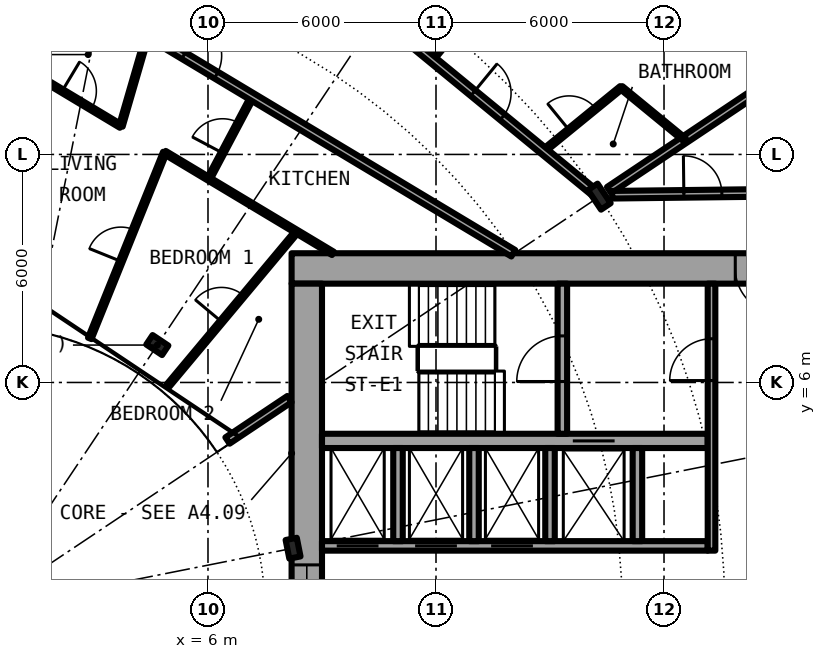
"""IFC4 building model, lengths in metres.
Left out: names, types, materials, properties, quantities, classifications, styles, units other than length and angle.
Written with IfcOpenShell. Run it as: python <this file> out.ifc"""

import sys

from ifc_helpers import new_model, si_unit, direction, frame, frame_2d, origin, origin_2d, place, context, subcontext, project, spatial, rectangle, i_section, extrude, element, fill, save


model = new_model("IFC4")
c1 = context("Model", 3, precision=1e-05, world=origin(), true_north=direction((0.0, 1.0)))
c2 = subcontext(c1, "Body", "Model", "MODEL_VIEW")
j1 = project(units=[si_unit("LENGTHUNIT", "METRE"), si_unit("PLANEANGLEUNIT", "RADIAN")], contexts=[c1])
p1 = place(None, origin())
s1 = spatial("IfcSite", under=j1, at=p1, CompositionType="ELEMENT")
p2 = place(p1, origin())
s2 = spatial("IfcBuilding", under=s1, at=p2, CompositionType="ELEMENT")
p3 = place(p2, frame((0.0, 0.0, 47.2)))
s3 = spatial("IfcBuildingStorey", under=s2, at=p3, CompositionType="ELEMENT", Elevation=47.2)
p4 = place(p3, frame((16.297, 10.889, 0.0), z_axis=(0.0, 0.0, 1.0), x_axis=(0.831469612303, 0.55557023302, 0.0)))
e1 = element("IfcColumn", 1, at=p4, inside=s3, PredefinedType="COLUMN", context=c2, shape_type="SweptSolid", body=[
    extrude(i_section(OverallWidth=0.305, OverallDepth=0.62, WebThickness=0.021, FlangeThickness=0.04, FilletRadius=0.027, at=origin_2d()), origin(), (0.0, 0.0, 1.0), 3.05),
])
for number, where, z_axis, x_axis in (
    (2, (8.239, 1.639, 0.0), (0.0, 0.0, 1.0), (0.981, 0.195, 0.0)),
    (3, (4.667, 6.984, 0.0), (0.0, 0.0, 1.0), (0.556, 0.831, 0.0)),
):
    element("IfcColumn", number, at=place(p3, frame(where, z_axis=z_axis, x_axis=x_axis)), inside=s3, PredefinedType="COLUMN", context=c2, shape_type="SweptSolid", body=[
        extrude(i_section(OverallWidth=0.3, OverallDepth=0.5, WebThickness=0.014, FlangeThickness=0.028, FilletRadius=0.027, at=origin_2d()), origin(), (0.0, 0.0, 1.0), 3.05),
    ])
p5 = place(p3, frame((22.4, 9.0, 0.0), z_axis=(0.0, 0.0, 1.0), x_axis=(-1.0, 0.0, 0.0)))
e4 = element("IfcWall", 4, at=p5, inside=s3, PredefinedType="SHEAR", context=c2, shape_type="SweptSolid", body=[
    extrude(rectangle(XDim=14.2, YDim=0.8, at=frame_2d((7.1, 0.0))), origin(), (0.0, 0.0, 1.0), 3.05),
])
p6 = place(p5, frame((1.325, 0.0, 0.0)))
e5 = element("IfcOpeningElement", 5, at=p6, cuts=e4, PredefinedType="OPENING", context=c2, shape_type="SweptSolid", body=[
    extrude(rectangle(XDim=1.2, YDim=2.3, at=frame_2d((0.6, 1.15))), frame((0.0, 0.41, 0.0), z_axis=(0.0, -1.0, 0.0), x_axis=(1.0, 0.0, 0.0)), (0.0, 0.0, 1.0), 0.82),
])
p7 = place(p3, frame((8.6, -8.6, 0.0), z_axis=(0.0, 0.0, 1.0), x_axis=(0.0, 1.0, 0.0)))
e6 = element("IfcWall", 6, at=p7, inside=s3, PredefinedType="SHEAR", context=c2, shape_type="SweptSolid", body=[
    extrude(rectangle(XDim=17.2, YDim=0.8, at=frame_2d((8.6, 0.0))), origin(), (0.0, 0.0, 1.0), 3.05),
])
p8 = place(p7, frame((7.4, 0.0, 0.1)))
e7 = element("IfcOpeningElement", 7, at=p8, cuts=e6, PredefinedType="OPENING", context=c2, shape_type="SweptSolid", body=[
    extrude(rectangle(XDim=2.4, YDim=2.2, at=frame_2d((1.2, 1.1))), frame((0.0, 0.41, 0.0), z_axis=(0.0, -1.0, 0.0), x_axis=(1.0, 0.0, 0.0)), (0.0, 0.0, 1.0), 0.82),
])
p9 = place(p3, frame((9.0, 1.7, 0.0), z_axis=(0.0, 0.0, 1.0), x_axis=(1.0, 0.0, 0.0)))
e8 = element("IfcWall", 8, at=p9, inside=s3, PredefinedType="SHEAR", context=c2, shape_type="SweptSolid", body=[
    extrude(rectangle(XDim=10.15, YDim=0.25, at=frame_2d((5.075, 0.0))), origin(), (0.0, 0.0, 1.0), 3.05),
])
p10 = place(p9, frame((0.387, 0.0, 0.0)))
e9 = element("IfcOpeningElement", 9, at=p10, cuts=e8, PredefinedType="OPENING", context=c2, shape_type="SweptSolid", body=[
    extrude(rectangle(XDim=1.1, YDim=2.3, at=frame_2d((0.55, 1.15))), frame((0.0, 0.135, 0.0), z_axis=(0.0, -1.0, 0.0), x_axis=(1.0, 0.0, 0.0)), (0.0, 0.0, 1.0), 0.27),
])
p11 = place(p9, frame((2.45, 0.0, 0.0)))
e10 = element("IfcOpeningElement", 10, at=p11, cuts=e8, PredefinedType="OPENING", context=c2, shape_type="SweptSolid", body=[
    extrude(rectangle(XDim=1.1, YDim=2.3, at=frame_2d((0.55, 1.15))), frame((0.0, 0.135, 0.0), z_axis=(0.0, -1.0, 0.0), x_axis=(1.0, 0.0, 0.0)), (0.0, 0.0, 1.0), 0.27),
])
p12 = place(p9, frame((4.45, 0.0, 0.0)))
e11 = element("IfcOpeningElement", 11, at=p12, cuts=e8, PredefinedType="OPENING", context=c2, shape_type="SweptSolid", body=[
    extrude(rectangle(XDim=1.1, YDim=2.3, at=frame_2d((0.55, 1.15))), frame((0.0, 0.135, 0.0), z_axis=(0.0, -1.0, 0.0), x_axis=(1.0, 0.0, 0.0)), (0.0, 0.0, 1.0), 0.27),
])
p13 = place(p3, frame((9.0, 4.462, 0.0), z_axis=(0.0, 0.0, 1.0), x_axis=(1.0, 0.0, 0.0)))
e12 = element("IfcWall", 12, at=p13, inside=s3, PredefinedType="SHEAR", context=c2, shape_type="SweptSolid", body=[
    extrude(rectangle(XDim=10.15, YDim=0.375, at=frame_2d((5.075, 0.0))), origin(), (0.0, 0.0, 1.0), 3.05),
])
p14 = place(p13, frame((6.6, 0.0, 0.0)))
e13 = element("IfcOpeningElement", 13, at=p14, cuts=e12, PredefinedType="OPENING", context=c2, shape_type="SweptSolid", body=[
    extrude(rectangle(XDim=1.1, YDim=2.3, at=frame_2d((0.55, 1.15))), frame((0.0, 0.198, 0.0), z_axis=(0.0, -1.0, 0.0), x_axis=(1.0, 0.0, 0.0)), (0.0, 0.0, 1.0), 0.395),
])
p15 = place(p3, frame((15.325, 4.65, 0.0), z_axis=(0.0, 0.0, 1.0), x_axis=(0.0, 1.0, 0.0)))
e14 = element("IfcWall", 14, at=p15, inside=s3, PredefinedType="SHEAR", context=c2, shape_type="SweptSolid", body=[
    extrude(rectangle(XDim=3.95, YDim=0.25, at=frame_2d((1.975, 0.0))), origin(), (0.0, 0.0, 1.0), 3.05),
])
p16 = place(p15, frame((1.375, 0.0, 0.0)))
e15 = element("IfcOpeningElement", 15, at=p16, cuts=e14, PredefinedType="OPENING", context=c2, shape_type="SweptSolid", body=[
    extrude(rectangle(XDim=1.2, YDim=2.3, at=frame_2d((0.6, 1.15))), frame((0.0, 0.135, 0.0), z_axis=(0.0, -1.0, 0.0), x_axis=(1.0, 0.0, 0.0)), (0.0, 0.0, 1.0), 0.27),
])
for number, where, z_axis, x_axis in (
    (16, (15.0, 1.825, 0.0), (0.0, 0.0, 1.0), (0.0, 1.0, 0.0)),
    (17, (17.3, 1.825, 0.0), (0.0, 0.0, 1.0), (0.0, 1.0, 0.0)),
):
    element("IfcWall", number, at=place(p3, frame(where, z_axis=z_axis, x_axis=x_axis)), inside=s3, PredefinedType="SOLIDWALL", context=c2, shape_type="SweptSolid", body=[
        extrude(rectangle(XDim=2.45, YDim=0.25, at=frame_2d((1.225, 0.0))), origin(), (0.0, 0.0, 1.0), 2.7),
    ])
p17 = place(p3, frame((19.25, 1.575, 0.0), z_axis=(0.0, 0.0, 1.0), x_axis=(0.0, 1.0, 0.0)))
e18 = element("IfcWall", 18, at=p17, inside=s3, PredefinedType="SOLIDWALL", context=c2, shape_type="SweptSolid", body=[
    extrude(rectangle(XDim=7.025, YDim=0.2, at=frame_2d((3.513, 0.0))), origin(), (0.0, 0.0, 1.0), 2.7),
])
p18 = place(p17, frame((4.475, 0.0, 0.0)))
e19 = element("IfcOpeningElement", 19, at=p18, cuts=e18, PredefinedType="OPENING", context=c2, shape_type="SweptSolid", body=[
    extrude(rectangle(XDim=1.1, YDim=2.3, at=frame_2d((0.55, 1.15))), frame((0.0, 0.11, 0.0), z_axis=(0.0, -1.0, 0.0), x_axis=(1.0, 0.0, 0.0)), (0.0, 0.0, 1.0), 0.22),
])
for number, where, z_axis, x_axis in (
    (20, (11.0, 1.825, 0.0), (0.0, 0.0, 1.0), (0.0, 1.0, 0.0)),
    (21, (13.0, 1.825, 0.0), (0.0, 0.0, 1.0), (0.0, 1.0, 0.0)),
):
    element("IfcWall", number, at=place(p3, frame(where, z_axis=z_axis, x_axis=x_axis)), inside=s3, PredefinedType="SOLIDWALL", context=c2, shape_type="SweptSolid", body=[
        extrude(rectangle(XDim=2.45, YDim=0.25, at=frame_2d((1.225, 0.0))), origin(), (0.0, 0.0, 1.0), 2.7),
    ])
p19 = place(p3, frame((2.889, 7.159, 0.0), z_axis=(0.0, 0.0, 1.0), x_axis=(0.374372761824, 0.927278294367, 0.0)))
e22 = element("IfcWall", 22, at=p19, inside=s3, PredefinedType="PARTITIONING", context=c2, shape_type="SweptSolid", body=[
    extrude(rectangle(XDim=5.276, YDim=0.1, at=frame_2d((2.638, 0.0))), origin(), (0.0, 0.0, 1.0), 2.7),
])
p20 = place(p19, frame((2.188, 0.0, 0.0)))
e23 = element("IfcOpeningElement", 23, at=p20, cuts=e22, PredefinedType="OPENING", context=c2, shape_type="SweptSolid", body=[
    extrude(rectangle(XDim=0.9, YDim=2.3, at=frame_2d((0.45, 1.15))), frame((0.0, 0.06, 0.0), z_axis=(0.0, -1.0, 0.0), x_axis=(1.0, 0.0, 0.0)), (0.0, 0.0, 1.0), 0.12),
])
p21 = place(p3, frame((3.706, 12.744, 0.0), z_axis=(0.0, 0.0, 1.0), x_axis=(0.279201466266, 0.960232545395, 0.0)))
e24 = element("IfcWall", 24, at=p21, inside=s3, PredefinedType="PARTITIONING", context=c2, shape_type="SweptSolid", body=[
    extrude(rectangle(XDim=2.524, YDim=0.1, at=frame_2d((1.262, 0.0))), origin(), (0.0, 0.0, 1.0), 2.7),
])
p22 = place(p3, frame((4.952, 5.923, 0.0), z_axis=(0.0, 0.0, 1.0), x_axis=(0.641376424834, 0.767226356213, 0.0)))
e25 = element("IfcWall", 25, at=p22, inside=s3, PredefinedType="PARTITIONING", context=c2, shape_type="SweptSolid", body=[
    extrude(rectangle(XDim=5.275, YDim=0.1, at=frame_2d((2.637, 0.0))), origin(), (0.0, 0.0, 1.0), 2.7),
])
p23 = place(p22, frame((2.187, 0.0, 0.0)))
e26 = element("IfcOpeningElement", 26, at=p23, cuts=e25, PredefinedType="OPENING", context=c2, shape_type="SweptSolid", body=[
    extrude(rectangle(XDim=0.9, YDim=2.3, at=frame_2d((0.45, 1.15))), frame((0.0, 0.06, 0.0), z_axis=(0.0, -1.0, 0.0), x_axis=(1.0, 0.0, 0.0)), (0.0, 0.0, 1.0), 0.12),
])
p24 = place(p3, frame((6.021, 11.357, 0.0), z_axis=(0.0, 0.0, 1.0), x_axis=(0.468337293896, 0.883549760425, 0.0)))
e27 = element("IfcWall", 27, at=p24, inside=s3, PredefinedType="PARTITIONING", context=c2, shape_type="SweptSolid", body=[
    extrude(rectangle(XDim=2.445, YDim=0.1, at=frame_2d((1.222, 0.0))), origin(), (0.0, 0.0, 1.0), 2.7),
])
p25 = place(p24, frame((0.772, 0.0, 0.0)))
e28 = element("IfcOpeningElement", 28, at=p25, cuts=e27, PredefinedType="OPENING", context=c2, shape_type="SweptSolid", body=[
    extrude(rectangle(XDim=0.9, YDim=2.3, at=frame_2d((0.45, 1.15))), frame((0.0, 0.06, 0.0), z_axis=(0.0, -1.0, 0.0), x_axis=(1.0, 0.0, 0.0)), (0.0, 0.0, 1.0), 0.12),
])
p26 = place(p3, frame((11.899, 14.499, 0.0), z_axis=(0.0, 0.0, 1.0), x_axis=(0.634396151441, 0.77300810024, 0.0)))
e29 = element("IfcWall", 29, at=p26, inside=s3, PredefinedType="PARTITIONING", context=c2, shape_type="SweptSolid", body=[
    extrude(rectangle(XDim=8.419, YDim=0.1, at=frame_2d((4.209, 0.0))), origin(), (0.0, 0.0, 1.0), 2.7),
])
p27 = place(p26, frame((0.84, 0.0, 0.0)))
e30 = element("IfcOpeningElement", 30, at=p27, cuts=e29, PredefinedType="OPENING", context=c2, shape_type="SweptSolid", body=[
    extrude(rectangle(XDim=0.9, YDim=2.3, at=frame_2d((0.45, 1.15))), frame((0.0, 0.06, 0.0), z_axis=(0.0, -1.0, 0.0), x_axis=(1.0, 0.0, 0.0)), (0.0, 0.0, 1.0), 0.12),
])
p28 = place(p26, frame((5.051, 0.0, 0.0)))
e31 = element("IfcOpeningElement", 31, at=p28, cuts=e29, PredefinedType="OPENING", context=c2, shape_type="SweptSolid", body=[
    extrude(rectangle(XDim=0.9, YDim=2.3, at=frame_2d((0.45, 1.15))), frame((0.0, 0.06, 0.0), z_axis=(0.0, -1.0, 0.0), x_axis=(1.0, 0.0, 0.0)), (0.0, 0.0, 1.0), 0.12),
])
p29 = place(p3, frame((14.831, 12.092, 0.0), z_axis=(0.0, 0.0, 1.0), x_axis=(0.774979608522, 0.631986239072, 0.0)))
e32 = element("IfcWall", 32, at=p29, inside=s3, PredefinedType="PARTITIONING", context=c2, shape_type="SweptSolid", body=[
    extrude(rectangle(XDim=2.636, YDim=0.1, at=frame_2d((1.318, 0.0))), origin(), (0.0, 0.0, 1.0), 2.7),
])
p30 = place(p29, frame((0.868, 0.0, 0.0)))
e33 = element("IfcOpeningElement", 33, at=p30, cuts=e32, PredefinedType="OPENING", context=c2, shape_type="SweptSolid", body=[
    extrude(rectangle(XDim=0.9, YDim=2.3, at=frame_2d((0.45, 1.15))), frame((0.0, 0.06, 0.0), z_axis=(0.0, -1.0, 0.0), x_axis=(1.0, 0.0, 0.0)), (0.0, 0.0, 1.0), 0.12),
])
p31 = place(p3, frame((16.555, 11.061, 0.0), z_axis=(0.0, 0.0, 1.0), x_axis=(0.831403467378, 0.55566921314, 0.0)))
e34 = element("IfcWall", 34, at=p31, inside=s3, PredefinedType="PARTITIONING", context=c2, shape_type="SweptSolid", body=[
    extrude(rectangle(XDim=7.265, YDim=0.2, at=frame_2d((3.632, 0.0))), origin(), (0.0, 0.0, 1.0), 2.7),
])
p32 = place(p3, frame((6.513, 4.472, 0.0), z_axis=(0.0, 0.0, 1.0), x_axis=(0.831417956244, 0.555647533996, 0.0)))
e35 = element("IfcWall", 35, at=p32, inside=s3, PredefinedType="PARTITIONING", context=c2, shape_type="SweptSolid", body=[
    extrude(rectangle(XDim=1.962, YDim=0.2, at=frame_2d((0.981, 0.0))), origin(), (0.0, 0.0, 1.0), 2.7),
])
p33 = place(p3, frame((16.636, 10.94, 0.0), z_axis=(0.0, 0.0, 1.0), x_axis=(0.999928980998, 0.011917758204, 0.0)))
e36 = element("IfcWall", 36, at=p33, inside=s3, PredefinedType="PARTITIONING", context=c2, shape_type="SweptSolid", body=[
    extrude(rectangle(XDim=5.039, YDim=0.2, at=frame_2d((2.52, 0.0))), origin(), (0.0, 0.0, 1.0), 2.7),
])
p34 = place(p33, frame((1.886, 0.0, 0.0)))
e37 = element("IfcOpeningElement", 37, at=p34, cuts=e36, PredefinedType="OPENING", context=c2, shape_type="SweptSolid", body=[
    extrude(rectangle(XDim=1.0, YDim=2.3, at=frame_2d((0.5, 1.15))), frame((0.0, 0.11, 0.0), z_axis=(0.0, -1.0, 0.0), x_axis=(1.0, 0.0, 0.0)), (0.0, 0.0, 1.0), 0.22),
])
p35 = place(p3, frame((1.392, 14.132, 0.0), z_axis=(0.0, 0.0, 1.0), x_axis=(0.857524856518, -0.514442533674, 0.0)))
e38 = element("IfcWall", 38, at=p35, inside=s3, PredefinedType="PARTITIONING", context=c2, shape_type="SweptSolid", body=[
    extrude(rectangle(XDim=2.698, YDim=0.1, at=frame_2d((1.349, 0.0))), origin(), (0.0, 0.0, 1.0), 2.7),
])
p36 = place(p35, frame((0.899, 0.0, 0.0)))
e39 = element("IfcOpeningElement", 39, at=p36, cuts=e38, PredefinedType="OPENING", context=c2, shape_type="SweptSolid", body=[
    extrude(rectangle(XDim=0.9, YDim=2.3, at=frame_2d((0.45, 1.15))), frame((0.0, 0.06, 0.0), z_axis=(0.0, -1.0, 0.0), x_axis=(1.0, 0.0, 0.0)), (0.0, 0.0, 1.0), 0.12),
])
p37 = place(p3, frame((4.863, 12.05, 0.0), z_axis=(0.0, 0.0, 1.0), x_axis=(0.857576410704, -0.51435658818, 0.0)))
e40 = element("IfcWall", 40, at=p37, inside=s3, PredefinedType="PARTITIONING", context=c2, shape_type="SweptSolid", body=[
    extrude(rectangle(XDim=5.16, YDim=0.1, at=frame_2d((2.58, 0.0))), origin(), (0.0, 0.0, 1.0), 2.7),
])
p38 = place(p3, frame((1.658, 16.819, 0.0), z_axis=(0.0, 0.0, 1.0), x_axis=(0.857688434449, -0.514169767113, 0.0)))
e41 = element("IfcWall", 41, at=p38, inside=s3, PredefinedType="PARTITIONING", context=c2, shape_type="SweptSolid", body=[
    extrude(rectangle(XDim=14.429, YDim=0.2, at=frame_2d((7.215, 0.0))), origin(), (0.0, 0.0, 1.0), 2.7),
])
p39 = place(p38, frame((4.316, 0.0, 0.0)))
e42 = element("IfcOpeningElement", 42, at=p39, cuts=e41, PredefinedType="OPENING", context=c2, shape_type="SweptSolid", body=[
    extrude(rectangle(XDim=1.0, YDim=2.3, at=frame_2d((0.5, 1.15))), frame((0.0, 0.11, 0.0), z_axis=(0.0, -1.0, 0.0), x_axis=(1.0, 0.0, 0.0)), (0.0, 0.0, 1.0), 0.22),
])
p40 = place(p3, frame((7.5, 18.108, 0.0), z_axis=(0.0, 0.0, 1.0), x_axis=(0.773041360816, -0.634355621452, 0.0)))
e43 = element("IfcWall", 43, at=p40, inside=s3, PredefinedType="PARTITIONING", context=c2, shape_type="SweptSolid", body=[
    extrude(rectangle(XDim=11.221, YDim=0.2, at=frame_2d((5.61, 0.0))), origin(), (0.0, 0.0, 1.0), 2.38),
])
p41 = place(p40, frame((7.083, 0.0, 0.0)))
e44 = element("IfcOpeningElement", 44, at=p41, cuts=e43, PredefinedType="OPENING", context=c2, shape_type="SweptSolid", body=[
    extrude(rectangle(XDim=1.0, YDim=2.3, at=frame_2d((0.5, 1.15))), frame((0.0, 0.11, 0.0), z_axis=(0.0, -1.0, 0.0), x_axis=(1.0, 0.0, 0.0)), (0.0, 0.0, 1.0), 0.22),
])
p42 = place(p3, frame((16.874, 13.758, 0.0), z_axis=(0.0, 0.0, 1.0), x_axis=(0.772948171844, -0.634469166818, 0.0)))
e45 = element("IfcWall", 45, at=p42, inside=s3, PredefinedType="PARTITIONING", context=c2, shape_type="SweptSolid", body=[
    extrude(rectangle(XDim=2.158, YDim=0.1, at=frame_2d((1.079, 0.0))), origin(), (0.0, 0.0, 1.0), 2.7),
])
p43 = place(p10, origin())
e46 = element("IfcDoor", 46, at=p43, inside=s3, OperationType="DOUBLE_DOOR_SLIDING", PredefinedType="DOOR", context=c2, shape_type="SweptSolid", body=[
    extrude(rectangle(XDim=1.1, YDim=2.3, at=frame_2d((0.55, 1.15))), frame((0.0, 0.025, 0.0), z_axis=(0.0, -1.0, 0.0), x_axis=(1.0, 0.0, 0.0)), (0.0, 0.0, 1.0), 0.05),
])
fill(e9, e46)
p44 = place(p11, origin())
e47 = element("IfcDoor", 47, at=p44, inside=s3, OperationType="DOUBLE_DOOR_SLIDING", PredefinedType="DOOR", context=c2, shape_type="SweptSolid", body=[
    extrude(rectangle(XDim=1.1, YDim=2.3, at=frame_2d((0.55, 1.15))), frame((0.0, 0.025, 0.0), z_axis=(0.0, -1.0, 0.0), x_axis=(1.0, 0.0, 0.0)), (0.0, 0.0, 1.0), 0.05),
])
fill(e10, e47)
p45 = place(p12, origin())
e48 = element("IfcDoor", 48, at=p45, inside=s3, OperationType="DOUBLE_DOOR_SLIDING", PredefinedType="DOOR", context=c2, shape_type="SweptSolid", body=[
    extrude(rectangle(XDim=1.1, YDim=2.3, at=frame_2d((0.55, 1.15))), frame((0.0, 0.025, 0.0), z_axis=(0.0, -1.0, 0.0), x_axis=(1.0, 0.0, 0.0)), (0.0, 0.0, 1.0), 0.05),
])
fill(e11, e48)
p46 = place(p14, origin())
e49 = element("IfcDoor", 49, at=p46, inside=s3, OperationType="DOUBLE_DOOR_SLIDING", PredefinedType="DOOR", context=c2, shape_type="SweptSolid", body=[
    extrude(rectangle(XDim=1.1, YDim=2.3, at=frame_2d((0.55, 1.15))), frame((0.0, 0.025, 0.0), z_axis=(0.0, -1.0, 0.0), x_axis=(1.0, 0.0, 0.0)), (0.0, 0.0, 1.0), 0.05),
])
fill(e13, e49)
p47 = place(p16, origin())
e50 = element("IfcDoor", 50, at=p47, inside=s3, OperationType="SINGLE_SWING_LEFT", PredefinedType="DOOR", context=c2, shape_type="SweptSolid", body=[
    extrude(rectangle(XDim=1.2, YDim=2.3, at=frame_2d((0.6, 1.15))), frame((0.0, 0.025, 0.0), z_axis=(0.0, -1.0, 0.0), x_axis=(1.0, 0.0, 0.0)), (0.0, 0.0, 1.0), 0.05),
])
fill(e15, e50)
p48 = place(p18, origin())
e51 = element("IfcDoor", 51, at=p48, inside=s3, OperationType="SINGLE_SWING_LEFT", PredefinedType="DOOR", context=c2, shape_type="SweptSolid", body=[
    extrude(rectangle(XDim=1.1, YDim=2.3, at=frame_2d((0.55, 1.15))), frame((0.0, 0.025, 0.0), z_axis=(0.0, -1.0, 0.0), x_axis=(1.0, 0.0, 0.0)), (0.0, 0.0, 1.0), 0.05),
])
fill(e19, e51)
p49 = place(p6, origin())
e52 = element("IfcDoor", 52, at=p49, inside=s3, OperationType="SINGLE_SWING_RIGHT", PredefinedType="DOOR", context=c2, shape_type="SweptSolid", body=[
    extrude(rectangle(XDim=1.2, YDim=2.3, at=frame_2d((0.6, 1.15))), frame((0.0, 0.025, 0.0), z_axis=(0.0, -1.0, 0.0), x_axis=(1.0, 0.0, 0.0)), (0.0, 0.0, 1.0), 0.05),
])
fill(e5, e52)
p50 = place(p8, origin())
e53 = element("IfcWindow", 53, at=p50, inside=s3, PartitioningType="SINGLE_PANEL", PredefinedType="WINDOW", context=c2, shape_type="SweptSolid", body=[
    extrude(rectangle(XDim=2.4, YDim=2.2, at=frame_2d((1.2, 1.1))), frame((0.0, 0.03, 0.0), z_axis=(0.0, -1.0, 0.0), x_axis=(1.0, 0.0, 0.0)), (0.0, 0.0, 1.0), 0.06),
])
fill(e7, e53)
p51 = place(p41, origin())
e54 = element("IfcDoor", 54, at=p51, inside=s3, OperationType="SINGLE_SWING_RIGHT", PredefinedType="DOOR", context=c2, shape_type="SweptSolid", body=[
    extrude(rectangle(XDim=1.0, YDim=2.3, at=frame_2d((0.5, 1.15))), frame((0.0, 0.025, 0.0), z_axis=(0.0, -1.0, 0.0), x_axis=(1.0, 0.0, 0.0)), (0.0, 0.0, 1.0), 0.05),
])
fill(e44, e54)
p52 = place(p30, origin())
e55 = element("IfcDoor", 55, at=p52, inside=s3, OperationType="SINGLE_SWING_RIGHT", PredefinedType="DOOR", context=c2, shape_type="SweptSolid", body=[
    extrude(rectangle(XDim=0.9, YDim=2.3, at=frame_2d((0.45, 1.15))), frame((0.0, 0.025, 0.0), z_axis=(0.0, -1.0, 0.0), x_axis=(1.0, 0.0, 0.0)), (0.0, 0.0, 1.0), 0.05),
])
fill(e33, e55)
p53 = place(p39, origin())
e56 = element("IfcDoor", 56, at=p53, inside=s3, OperationType="SINGLE_SWING_LEFT", PredefinedType="DOOR", context=c2, shape_type="SweptSolid", body=[
    extrude(rectangle(XDim=1.0, YDim=2.3, at=frame_2d((0.5, 1.15))), frame((0.0, 0.025, 0.0), z_axis=(0.0, -1.0, 0.0), x_axis=(1.0, 0.0, 0.0)), (0.0, 0.0, 1.0), 0.05),
])
fill(e42, e56)
p54 = place(p36, origin())
e57 = element("IfcDoor", 57, at=p54, inside=s3, OperationType="SINGLE_SWING_RIGHT", PredefinedType="DOOR", context=c2, shape_type="SweptSolid", body=[
    extrude(rectangle(XDim=0.9, YDim=2.3, at=frame_2d((0.45, 1.15))), frame((0.0, 0.025, 0.0), z_axis=(0.0, -1.0, 0.0), x_axis=(1.0, 0.0, 0.0)), (0.0, 0.0, 1.0), 0.05),
])
fill(e39, e57)
p55 = place(p25, origin())
e58 = element("IfcDoor", 58, at=p55, inside=s3, OperationType="SINGLE_SWING_RIGHT", PredefinedType="DOOR", context=c2, shape_type="SweptSolid", body=[
    extrude(rectangle(XDim=0.9, YDim=2.3, at=frame_2d((0.45, 1.15))), frame((0.0, 0.025, 0.0), z_axis=(0.0, -1.0, 0.0), x_axis=(1.0, 0.0, 0.0)), (0.0, 0.0, 1.0), 0.05),
])
fill(e28, e58)
p56 = place(p20, origin())
e59 = element("IfcDoor", 59, at=p56, inside=s3, OperationType="SINGLE_SWING_RIGHT", PredefinedType="DOOR", context=c2, shape_type="SweptSolid", body=[
    extrude(rectangle(XDim=0.9, YDim=2.3, at=frame_2d((0.45, 1.15))), frame((0.0, 0.025, 0.0), z_axis=(0.0, -1.0, 0.0), x_axis=(1.0, 0.0, 0.0)), (0.0, 0.0, 1.0), 0.05),
])
fill(e23, e59)
p57 = place(p23, origin())
e60 = element("IfcDoor", 60, at=p57, inside=s3, OperationType="SINGLE_SWING_RIGHT", PredefinedType="DOOR", context=c2, shape_type="SweptSolid", body=[
    extrude(rectangle(XDim=0.9, YDim=2.3, at=frame_2d((0.45, 1.15))), frame((0.0, 0.025, 0.0), z_axis=(0.0, -1.0, 0.0), x_axis=(1.0, 0.0, 0.0)), (0.0, 0.0, 1.0), 0.05),
])
fill(e26, e60)
p58 = place(p34, origin())
e61 = element("IfcDoor", 61, at=p58, inside=s3, OperationType="SINGLE_SWING_LEFT", PredefinedType="DOOR", context=c2, shape_type="SweptSolid", body=[
    extrude(rectangle(XDim=1.0, YDim=2.3, at=frame_2d((0.5, 1.15))), frame((0.0, 0.025, 0.0), z_axis=(0.0, -1.0, 0.0), x_axis=(1.0, 0.0, 0.0)), (0.0, 0.0, 1.0), 0.05),
])
fill(e37, e61)
save(model, sys.argv[1])
